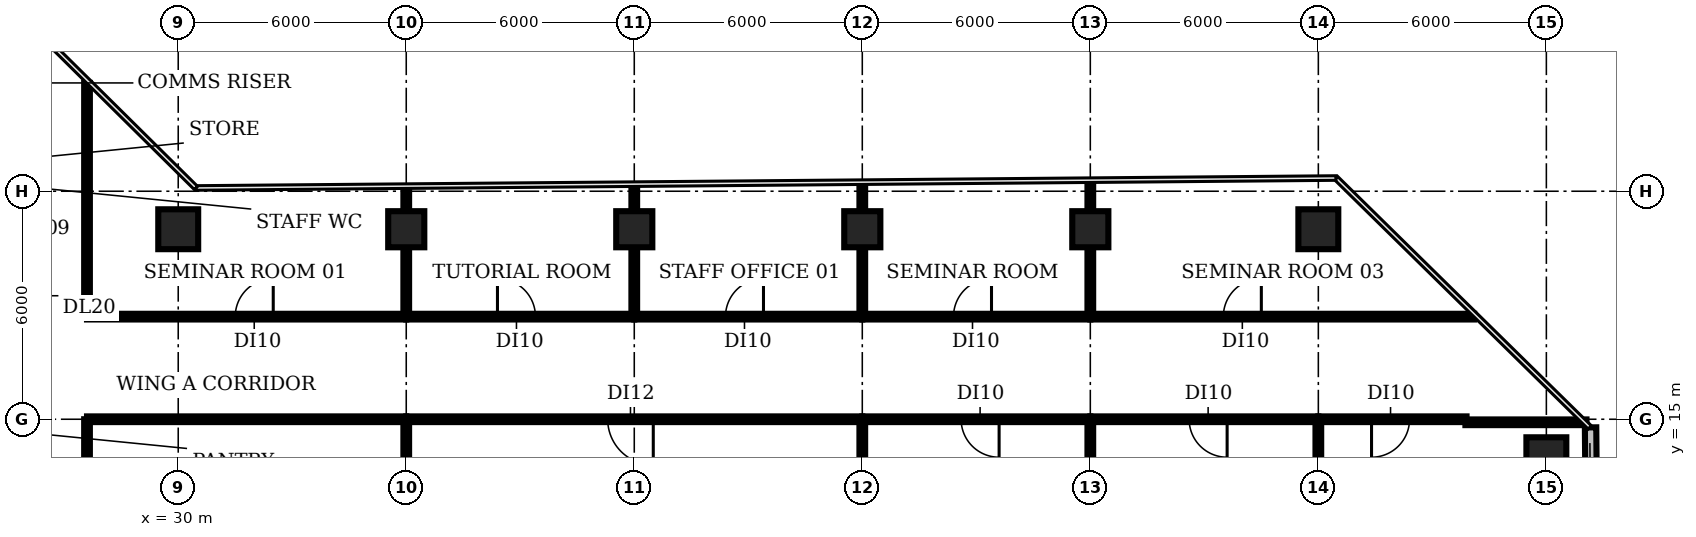
"""IFC4 building model, lengths in metres.
Left out: names, types, materials, properties, quantities, classifications, styles, units other than length and angle.
Written with IfcOpenShell. Run it as: python <this file> out.ifc"""

import sys

from ifc_helpers import new_model, si_unit, direction, frame, frame_2d, origin, origin_2d, place, context, subcontext, project, spatial, rectangle, circle, extrude, element, fill, save


model = new_model("IFC4")
c1 = context("Model", 3, precision=1e-05, world=origin(), true_north=direction((0.0, 1.0)))
c2 = subcontext(c1, "Body", "Model", "MODEL_VIEW")
j1 = project(units=[si_unit("LENGTHUNIT", "METRE"), si_unit("PLANEANGLEUNIT", "RADIAN")], contexts=[c1])
p1 = place(None, origin())
s1 = spatial("IfcSite", under=j1, at=p1, CompositionType="ELEMENT")
p2 = place(p1, origin())
s2 = spatial("IfcBuilding", under=s1, at=p2, CompositionType="ELEMENT")
p3 = place(p2, frame((0.0, 0.0, 54.2)))
s3 = spatial("IfcBuildingStorey", under=s2, at=p3, CompositionType="ELEMENT", Elevation=54.2)
p4 = place(p3, frame((30.0, 20.0, 0.0), z_axis=(0.0, 0.0, 1.0), x_axis=(1.0, 0.0, 0.0)))
e1 = element("IfcColumn", 1, at=p4, inside=s3, PredefinedType="COLUMN", context=c2, shape_type="SweptSolid", body=[
    extrude(circle(Radius=0.525, at=origin_2d()), origin(), (0.0, 0.0, 1.0), 3.85),
])
for number, where, z_axis, x_axis in (
    (2, (36.0, 20.0, 0.0), (0.0, 0.0, 1.0), (1.0, 0.0, 0.0)),
    (3, (42.0, 20.0, 0.0), (0.0, 0.0, 1.0), (1.0, 0.0, 0.0)),
    (4, (48.0, 20.0, 0.0), (0.0, 0.0, 1.0), (1.0, 0.0, 0.0)),
    (5, (54.0, 20.0, 0.0), (0.0, 0.0, 1.0), (1.0, 0.0, 0.0)),
):
    element("IfcColumn", number, at=place(p3, frame(where, z_axis=z_axis, x_axis=x_axis)), inside=s3, PredefinedType="COLUMN", context=c2, shape_type="SweptSolid", body=[
        extrude(rectangle(XDim=0.95, YDim=0.95, at=origin_2d()), origin(), (0.0, 0.0, 1.0), 3.85),
    ])
for number, where, z_axis, x_axis in (
    (6, (60.0, 20.0, 0.0), (0.0, 0.0, 1.0), (1.0, 0.0, 0.0)),
    (7, (66.0, 14.0, 0.0), (0.0, 0.0, 1.0), (1.0, 0.0, 0.0)),
):
    element("IfcColumn", number, at=place(p3, frame(where, z_axis=z_axis, x_axis=x_axis)), inside=s3, PredefinedType="COLUMN", context=c2, shape_type="SweptSolid", body=[
        extrude(circle(Radius=0.525, at=origin_2d()), origin(), (0.0, 0.0, 1.0), 3.85),
    ])
p5 = place(p3, frame((67.184, 12.467, 0.0), z_axis=(0.0, 0.0, 1.0), x_axis=(-0.008738348184, 0.999961819907, 0.0)))
e8 = element("IfcWall", 8, at=p5, inside=s3, PredefinedType="SOLIDWALL", context=c2, shape_type="SweptSolid", body=[
    extrude(rectangle(XDim=2.319, YDim=0.3, at=frame_2d((1.159, 0.0))), origin(), (0.0, 0.0, 1.0), 3.85),
])
p6 = place(p3, frame((27.6, 15.0, 0.0), z_axis=(0.0, 0.0, 1.0), x_axis=(0.0, -1.0, 0.0)))
e9 = element("IfcWall", 9, at=p6, inside=s3, PredefinedType="PARTITIONING", context=c2, shape_type="SweptSolid", body=[
    extrude(rectangle(XDim=10.5, YDim=0.15, at=frame_2d((5.25, 0.0))), origin(), (0.0, 0.0, 1.0), 2.83),
])
p7 = place(p6, frame((4.8, 0.0, 0.0)))
e10 = element("IfcOpeningElement", 10, at=p7, cuts=e9, PredefinedType="OPENING", context=c2, shape_type="SweptSolid", body=[
    extrude(rectangle(XDim=1.0, YDim=2.1, at=frame_2d((0.5, 1.05))), frame((0.0, 0.085, 0.0), z_axis=(0.0, -1.0, 0.0), x_axis=(1.0, 0.0, 0.0)), (0.0, 0.0, 1.0), 0.17),
])
p8 = place(p3, frame((27.6, 15.0, 0.0), z_axis=(0.0, 0.0, 1.0), x_axis=(1.0, 0.0, 0.0)))
e11 = element("IfcWall", 11, at=p8, inside=s3, PredefinedType="PARTITIONING", context=c2, shape_type="SweptSolid", body=[
    extrude(rectangle(XDim=8.4, YDim=0.15, at=frame_2d((4.2, 0.0))), origin(), (0.0, 0.0, 1.0), 2.83),
])
p9 = place(p3, frame((27.6, 17.7, 0.0), z_axis=(0.0, 0.0, 1.0), x_axis=(0.0, 1.0, 0.0)))
e12 = element("IfcWall", 12, at=p9, inside=s3, PredefinedType="PARTITIONING", context=c2, shape_type="SweptSolid", body=[
    extrude(rectangle(XDim=6.15, YDim=0.15, at=frame_2d((3.075, 0.0))), origin(), (0.0, 0.0, 1.0), 2.83),
])
p10 = place(p3, frame((27.6, 17.7, 0.0), z_axis=(0.0, 0.0, 1.0), x_axis=(1.0, 0.0, 0.0)))
e13 = element("IfcWall", 13, at=p10, inside=s3, PredefinedType="PARTITIONING", context=c2, shape_type="SweptSolid", body=[
    extrude(rectangle(XDim=8.4, YDim=0.15, at=frame_2d((4.2, 0.0))), origin(), (0.0, 0.0, 1.0), 2.83),
])
p11 = place(p10, frame((3.9, 0.0, 0.0)))
e14 = element("IfcOpeningElement", 14, at=p11, cuts=e13, PredefinedType="OPENING", context=c2, shape_type="SweptSolid", body=[
    extrude(rectangle(XDim=1.0, YDim=2.1, at=frame_2d((0.5, 1.05))), frame((0.0, 0.085, 0.0), z_axis=(0.0, -1.0, 0.0), x_axis=(1.0, 0.0, 0.0)), (0.0, 0.0, 1.0), 0.17),
])
p12 = place(p3, frame((36.0, -5.01, 0.0), z_axis=(0.0, 0.0, 1.0), x_axis=(0.0, 1.0, 0.0)))
e15 = element("IfcWall", 15, at=p12, inside=s3, PredefinedType="PARTITIONING", context=c2, shape_type="SweptSolid", body=[
    extrude(rectangle(XDim=20.01, YDim=0.15, at=frame_2d((10.005, 0.0))), origin(), (0.0, 0.0, 1.0), 2.83),
])
p13 = place(p3, frame((36.0, 17.7, 0.0), z_axis=(0.0, 0.0, 1.0), x_axis=(0.0, 1.0, 0.0)))
e16 = element("IfcWall", 16, at=p13, inside=s3, PredefinedType="PARTITIONING", context=c2, shape_type="SweptSolid", body=[
    extrude(rectangle(XDim=3.38, YDim=0.15, at=frame_2d((1.69, 0.0))), origin(), (0.0, 0.0, 1.0), 2.83),
])
p14 = place(p3, frame((36.0, 17.7, 0.0), z_axis=(0.0, 0.0, 1.0), x_axis=(1.0, 0.0, 0.0)))
e17 = element("IfcWall", 17, at=p14, inside=s3, PredefinedType="PARTITIONING", context=c2, shape_type="SweptSolid", body=[
    extrude(rectangle(XDim=6.0, YDim=0.15, at=frame_2d((3.0, 0.0))), origin(), (0.0, 0.0, 1.0), 2.83),
])
p15 = place(p14, frame((2.4, 0.0, 0.0)))
e18 = element("IfcOpeningElement", 18, at=p15, cuts=e17, PredefinedType="OPENING", context=c2, shape_type="SweptSolid", body=[
    extrude(rectangle(XDim=1.0, YDim=2.1, at=frame_2d((0.5, 1.05))), frame((0.0, 0.085, 0.0), z_axis=(0.0, -1.0, 0.0), x_axis=(1.0, 0.0, 0.0)), (0.0, 0.0, 1.0), 0.17),
])
p16 = place(p3, frame((42.0, 17.7, 0.0), z_axis=(0.0, 0.0, 1.0), x_axis=(0.0, 1.0, 0.0)))
e19 = element("IfcWall", 19, at=p16, inside=s3, PredefinedType="PARTITIONING", context=c2, shape_type="SweptSolid", body=[
    extrude(rectangle(XDim=3.44, YDim=0.15, at=frame_2d((1.72, 0.0))), origin(), (0.0, 0.0, 1.0), 2.83),
])
p17 = place(p3, frame((42.0, 17.7, 0.0), z_axis=(0.0, 0.0, 1.0), x_axis=(1.0, 0.0, 0.0)))
e20 = element("IfcWall", 20, at=p17, inside=s3, PredefinedType="PARTITIONING", context=c2, shape_type="SweptSolid", body=[
    extrude(rectangle(XDim=6.0, YDim=0.15, at=frame_2d((3.0, 0.0))), origin(), (0.0, 0.0, 1.0), 2.83),
])
p18 = place(p17, frame((2.4, 0.0, 0.0)))
e21 = element("IfcOpeningElement", 21, at=p18, cuts=e20, PredefinedType="OPENING", context=c2, shape_type="SweptSolid", body=[
    extrude(rectangle(XDim=1.0, YDim=2.1, at=frame_2d((0.5, 1.05))), frame((0.0, 0.085, 0.0), z_axis=(0.0, -1.0, 0.0), x_axis=(1.0, 0.0, 0.0)), (0.0, 0.0, 1.0), 0.17),
])
p19 = place(p3, frame((48.0, -5.01, 0.0), z_axis=(0.0, 0.0, 1.0), x_axis=(0.0, 1.0, 0.0)))
e22 = element("IfcWall", 22, at=p19, inside=s3, PredefinedType="PARTITIONING", context=c2, shape_type="SweptSolid", body=[
    extrude(rectangle(XDim=20.01, YDim=0.15, at=frame_2d((10.005, 0.0))), origin(), (0.0, 0.0, 1.0), 2.83),
])
p20 = place(p3, frame((48.0, 15.0, 0.0), z_axis=(0.0, 0.0, 1.0), x_axis=(-1.0, 0.0, 0.0)))
e23 = element("IfcWall", 23, at=p20, inside=s3, PredefinedType="PARTITIONING", context=c2, shape_type="SweptSolid", body=[
    extrude(rectangle(XDim=12.0, YDim=0.15, at=frame_2d((6.0, 0.0))), origin(), (0.0, 0.0, 1.0), 2.83),
])
p21 = place(p20, frame((5.5, 0.0, 0.0)))
e24 = element("IfcOpeningElement", 24, at=p21, cuts=e23, PredefinedType="OPENING", context=c2, shape_type="SweptSolid", body=[
    extrude(rectangle(XDim=1.2, YDim=2.1, at=frame_2d((0.6, 1.05))), frame((0.0, 0.085, 0.0), z_axis=(0.0, -1.0, 0.0), x_axis=(1.0, 0.0, 0.0)), (0.0, 0.0, 1.0), 0.17),
])
p22 = place(p3, frame((48.0, 17.7, 0.0), z_axis=(0.0, 0.0, 1.0), x_axis=(0.0, 1.0, 0.0)))
e25 = element("IfcWall", 25, at=p22, inside=s3, PredefinedType="PARTITIONING", context=c2, shape_type="SweptSolid", body=[
    extrude(rectangle(XDim=3.49, YDim=0.15, at=frame_2d((1.745, 0.0))), origin(), (0.0, 0.0, 1.0), 2.83),
])
p23 = place(p3, frame((48.0, 17.7, 0.0), z_axis=(0.0, 0.0, 1.0), x_axis=(1.0, 0.0, 0.0)))
e26 = element("IfcWall", 26, at=p23, inside=s3, PredefinedType="PARTITIONING", context=c2, shape_type="SweptSolid", body=[
    extrude(rectangle(XDim=6.0, YDim=0.15, at=frame_2d((3.0, 0.0))), origin(), (0.0, 0.0, 1.0), 2.83),
])
p24 = place(p23, frame((2.4, 0.0, 0.0)))
e27 = element("IfcOpeningElement", 27, at=p24, cuts=e26, PredefinedType="OPENING", context=c2, shape_type="SweptSolid", body=[
    extrude(rectangle(XDim=1.0, YDim=2.1, at=frame_2d((0.5, 1.05))), frame((0.0, 0.085, 0.0), z_axis=(0.0, -1.0, 0.0), x_axis=(1.0, 0.0, 0.0)), (0.0, 0.0, 1.0), 0.17),
])
p25 = place(p3, frame((54.0, -5.01, 0.0), z_axis=(0.0, 0.0, 1.0), x_axis=(0.0, 1.0, 0.0)))
e28 = element("IfcWall", 28, at=p25, inside=s3, PredefinedType="PARTITIONING", context=c2, shape_type="SweptSolid", body=[
    extrude(rectangle(XDim=20.01, YDim=0.15, at=frame_2d((10.005, 0.0))), origin(), (0.0, 0.0, 1.0), 2.83),
])
p26 = place(p3, frame((54.0, 15.0, 0.0), z_axis=(0.0, 0.0, 1.0), x_axis=(-1.0, 0.0, 0.0)))
e29 = element("IfcWall", 29, at=p26, inside=s3, PredefinedType="PARTITIONING", context=c2, shape_type="SweptSolid", body=[
    extrude(rectangle(XDim=6.0, YDim=0.15, at=frame_2d((3.0, 0.0))), origin(), (0.0, 0.0, 1.0), 2.83),
])
p27 = place(p26, frame((2.4, 0.0, 0.0)))
e30 = element("IfcOpeningElement", 30, at=p27, cuts=e29, PredefinedType="OPENING", context=c2, shape_type="SweptSolid", body=[
    extrude(rectangle(XDim=1.0, YDim=2.1, at=frame_2d((0.5, 1.05))), frame((0.0, 0.085, 0.0), z_axis=(0.0, -1.0, 0.0), x_axis=(1.0, 0.0, 0.0)), (0.0, 0.0, 1.0), 0.17),
])
p28 = place(p3, frame((54.0, 17.7, 0.0), z_axis=(0.0, 0.0, 1.0), x_axis=(0.0, 1.0, 0.0)))
e31 = element("IfcWall", 31, at=p28, inside=s3, PredefinedType="PARTITIONING", context=c2, shape_type="SweptSolid", body=[
    extrude(rectangle(XDim=3.54, YDim=0.15, at=frame_2d((1.77, 0.0))), origin(), (0.0, 0.0, 1.0), 2.83),
])
p29 = place(p3, frame((54.0, 17.7, 0.0), z_axis=(0.0, 0.0, 1.0), x_axis=(1.0, 0.0, 0.0)))
e32 = element("IfcWall", 32, at=p29, inside=s3, PredefinedType="PARTITIONING", context=c2, shape_type="SweptSolid", body=[
    extrude(rectangle(XDim=10.1, YDim=0.15, at=frame_2d((5.05, 0.0))), origin(), (0.0, 0.0, 1.0), 2.83),
])
p30 = place(p29, frame((3.5, 0.0, 0.0)))
e33 = element("IfcOpeningElement", 33, at=p30, cuts=e32, PredefinedType="OPENING", context=c2, shape_type="SweptSolid", body=[
    extrude(rectangle(XDim=1.0, YDim=2.1, at=frame_2d((0.5, 1.05))), frame((0.0, 0.085, 0.0), z_axis=(0.0, -1.0, 0.0), x_axis=(1.0, 0.0, 0.0)), (0.0, 0.0, 1.0), 0.17),
])
p31 = place(p3, frame((60.0, -5.01, 0.0), z_axis=(0.0, 0.0, 1.0), x_axis=(0.0, 1.0, 0.0)))
e34 = element("IfcWall", 34, at=p31, inside=s3, PredefinedType="PARTITIONING", context=c2, shape_type="SweptSolid", body=[
    extrude(rectangle(XDim=20.01, YDim=0.15, at=frame_2d((10.005, 0.0))), origin(), (0.0, 0.0, 1.0), 2.83),
])
p32 = place(p3, frame((60.0, 15.0, 0.0), z_axis=(0.0, 0.0, 1.0), x_axis=(-1.0, 0.0, 0.0)))
e35 = element("IfcWall", 35, at=p32, inside=s3, PredefinedType="PARTITIONING", context=c2, shape_type="SweptSolid", body=[
    extrude(rectangle(XDim=6.0, YDim=0.15, at=frame_2d((3.0, 0.0))), origin(), (0.0, 0.0, 1.0), 2.83),
])
p33 = place(p32, frame((2.4, 0.0, 0.0)))
e36 = element("IfcOpeningElement", 36, at=p33, cuts=e35, PredefinedType="OPENING", context=c2, shape_type="SweptSolid", body=[
    extrude(rectangle(XDim=1.0, YDim=2.1, at=frame_2d((0.5, 1.05))), frame((0.0, 0.085, 0.0), z_axis=(0.0, -1.0, 0.0), x_axis=(1.0, 0.0, 0.0)), (0.0, 0.0, 1.0), 0.17),
])
p34 = place(p3, frame((63.87, 14.92, 0.0), z_axis=(0.0, 0.0, 1.0), x_axis=(1.0, 0.0, 0.0)))
e37 = element("IfcWall", 37, at=p34, inside=s3, PredefinedType="PARTITIONING", context=c2, shape_type="SweptSolid", body=[
    extrude(rectangle(XDim=3.186, YDim=0.15, at=frame_2d((1.593, 0.0))), origin(), (0.0, 0.0, 1.0), 2.83),
])
p35 = place(p3, frame((63.9, 15.0, 0.0), z_axis=(0.0, 0.0, 1.0), x_axis=(-1.0, 0.0, 0.0)))
e38 = element("IfcWall", 38, at=p35, inside=s3, PredefinedType="PARTITIONING", context=c2, shape_type="SweptSolid", body=[
    extrude(rectangle(XDim=3.9, YDim=0.15, at=frame_2d((1.95, 0.0))), origin(), (0.0, 0.0, 1.0), 2.83),
])
p36 = place(p35, frame((1.5, 0.0, 0.0)))
e39 = element("IfcOpeningElement", 39, at=p36, cuts=e38, PredefinedType="OPENING", context=c2, shape_type="SweptSolid", body=[
    extrude(rectangle(XDim=1.0, YDim=2.1, at=frame_2d((0.5, 1.05))), frame((0.0, 0.085, 0.0), z_axis=(0.0, -1.0, 0.0), x_axis=(1.0, 0.0, 0.0)), (0.0, 0.0, 1.0), 0.17),
])
p37 = place(p11, origin())
e40 = element("IfcDoor", 40, at=p37, inside=s3, OperationType="SINGLE_SWING_RIGHT", PredefinedType="DOOR", context=c2, shape_type="SweptSolid", body=[
    extrude(rectangle(XDim=1.0, YDim=2.1, at=frame_2d((0.5, 1.05))), frame((0.0, 0.025, 0.0), z_axis=(0.0, -1.0, 0.0), x_axis=(1.0, 0.0, 0.0)), (0.0, 0.0, 1.0), 0.05),
])
fill(e14, e40)
p38 = place(p15, origin())
e41 = element("IfcDoor", 41, at=p38, inside=s3, OperationType="SINGLE_SWING_LEFT", PredefinedType="DOOR", context=c2, shape_type="SweptSolid", body=[
    extrude(rectangle(XDim=1.0, YDim=2.1, at=frame_2d((0.5, 1.05))), frame((0.0, 0.025, 0.0), z_axis=(0.0, -1.0, 0.0), x_axis=(1.0, 0.0, 0.0)), (0.0, 0.0, 1.0), 0.05),
])
fill(e18, e41)
p39 = place(p18, origin())
e42 = element("IfcDoor", 42, at=p39, inside=s3, OperationType="SINGLE_SWING_RIGHT", PredefinedType="DOOR", context=c2, shape_type="SweptSolid", body=[
    extrude(rectangle(XDim=1.0, YDim=2.1, at=frame_2d((0.5, 1.05))), frame((0.0, 0.025, 0.0), z_axis=(0.0, -1.0, 0.0), x_axis=(1.0, 0.0, 0.0)), (0.0, 0.0, 1.0), 0.05),
])
fill(e21, e42)
p40 = place(p21, origin())
e43 = element("IfcDoor", 43, at=p40, inside=s3, OperationType="SINGLE_SWING_LEFT", PredefinedType="DOOR", context=c2, shape_type="SweptSolid", body=[
    extrude(rectangle(XDim=1.2, YDim=2.1, at=frame_2d((0.6, 1.05))), frame((0.0, 0.025, 0.0), z_axis=(0.0, -1.0, 0.0), x_axis=(1.0, 0.0, 0.0)), (0.0, 0.0, 1.0), 0.05),
])
fill(e24, e43)
p41 = place(p24, origin())
e44 = element("IfcDoor", 44, at=p41, inside=s3, OperationType="SINGLE_SWING_RIGHT", PredefinedType="DOOR", context=c2, shape_type="SweptSolid", body=[
    extrude(rectangle(XDim=1.0, YDim=2.1, at=frame_2d((0.5, 1.05))), frame((0.0, 0.025, 0.0), z_axis=(0.0, -1.0, 0.0), x_axis=(1.0, 0.0, 0.0)), (0.0, 0.0, 1.0), 0.05),
])
fill(e27, e44)
p42 = place(p27, origin())
e45 = element("IfcDoor", 45, at=p42, inside=s3, OperationType="SINGLE_SWING_LEFT", PredefinedType="DOOR", context=c2, shape_type="SweptSolid", body=[
    extrude(rectangle(XDim=1.0, YDim=2.1, at=frame_2d((0.5, 1.05))), frame((0.0, 0.025, 0.0), z_axis=(0.0, -1.0, 0.0), x_axis=(1.0, 0.0, 0.0)), (0.0, 0.0, 1.0), 0.05),
])
fill(e30, e45)
p43 = place(p30, origin())
e46 = element("IfcDoor", 46, at=p43, inside=s3, OperationType="SINGLE_SWING_RIGHT", PredefinedType="DOOR", context=c2, shape_type="SweptSolid", body=[
    extrude(rectangle(XDim=1.0, YDim=2.1, at=frame_2d((0.5, 1.05))), frame((0.0, 0.025, 0.0), z_axis=(0.0, -1.0, 0.0), x_axis=(1.0, 0.0, 0.0)), (0.0, 0.0, 1.0), 0.05),
])
fill(e33, e46)
p44 = place(p33, origin())
e47 = element("IfcDoor", 47, at=p44, inside=s3, OperationType="SINGLE_SWING_LEFT", PredefinedType="DOOR", context=c2, shape_type="SweptSolid", body=[
    extrude(rectangle(XDim=1.0, YDim=2.1, at=frame_2d((0.5, 1.05))), frame((0.0, 0.025, 0.0), z_axis=(0.0, -1.0, 0.0), x_axis=(1.0, 0.0, 0.0)), (0.0, 0.0, 1.0), 0.05),
])
fill(e36, e47)
p45 = place(p36, origin())
e48 = element("IfcDoor", 48, at=p45, inside=s3, OperationType="SINGLE_SWING_RIGHT", PredefinedType="DOOR", context=c2, shape_type="SweptSolid", body=[
    extrude(rectangle(XDim=1.0, YDim=2.1, at=frame_2d((0.5, 1.05))), frame((0.0, 0.025, 0.0), z_axis=(0.0, -1.0, 0.0), x_axis=(1.0, 0.0, 0.0)), (0.0, 0.0, 1.0), 0.05),
])
fill(e39, e48)
save(model, sys.argv[1])
